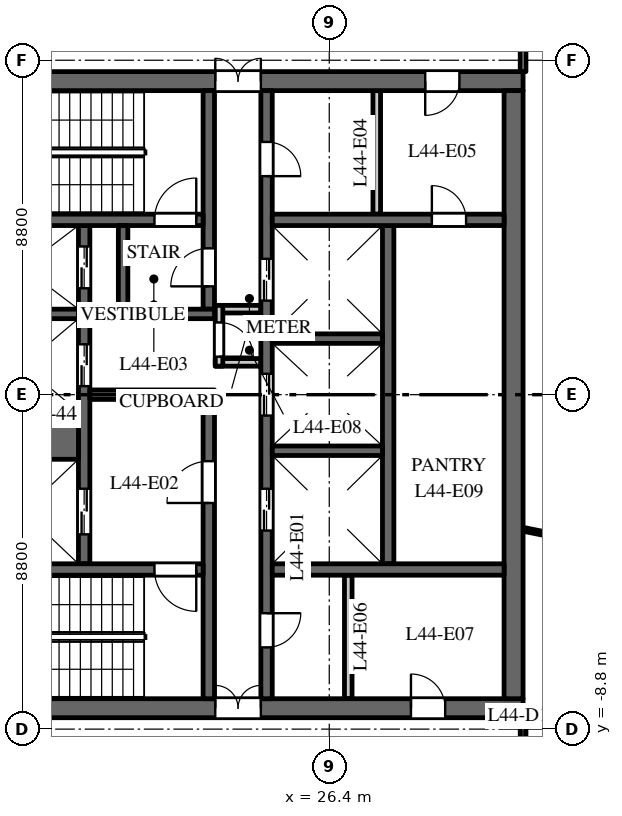
"""IFC4 building model, lengths in metres.
Left out: names, types, materials, properties, quantities, classifications, styles, units other than length and angle.
Written with IfcOpenShell. Run it as: python <this file> out.ifc"""

import sys

from ifc_helpers import new_model, si_unit, direction, frame, frame_2d, origin, place, context, subcontext, project, spatial, rectangle, extrude, element, fill, save


model = new_model("IFC4")
c1 = context("Model", 3, precision=1e-05, world=origin(), true_north=direction((0.0, 1.0)))
c2 = subcontext(c1, "Body", "Model", "MODEL_VIEW")
j1 = project(units=[si_unit("LENGTHUNIT", "METRE"), si_unit("PLANEANGLEUNIT", "RADIAN")], contexts=[c1])
p1 = place(None, origin())
s1 = spatial("IfcSite", under=j1, at=p1, CompositionType="ELEMENT")
p2 = place(p1, origin())
s2 = spatial("IfcBuilding", under=s1, at=p2, CompositionType="ELEMENT")
p3 = place(p2, frame((0.0, 0.0, 190.0)))
s3 = spatial("IfcBuildingStorey", under=s2, at=p3, CompositionType="ELEMENT", Elevation=190.0)
p4 = place(p3, frame((16.5, 8.25, 0.0), z_axis=(0.0, 0.0, 1.0), x_axis=(1.0, 0.0, 0.0)))
e1 = element("IfcWall", 1, at=p4, inside=s3, PredefinedType="SHEAR", context=c2, shape_type="SweptSolid", body=[
    extrude(rectangle(XDim=15.0, YDim=0.5, at=frame_2d((7.5, 0.0))), origin(), (0.0, 0.0, 1.0), 3.7),
])
p5 = place(p4, frame((6.9, 0.0, 0.0)))
e2 = element("IfcOpeningElement", 2, at=p5, cuts=e1, PredefinedType="OPENING", context=c2, shape_type="SweptSolid", body=[
    extrude(rectangle(XDim=1.2, YDim=2.1, at=frame_2d((0.6, 1.05))), frame((0.0, 0.26, 0.0), z_axis=(0.0, -1.0, 0.0), x_axis=(1.0, 0.0, 0.0)), (0.0, 0.0, 1.0), 0.52),
])
p6 = place(p4, frame((12.425, 0.0, 0.0)))
e3 = element("IfcOpeningElement", 3, at=p6, cuts=e1, PredefinedType="OPENING", context=c2, shape_type="SweptSolid", body=[
    extrude(rectangle(XDim=0.9, YDim=2.1, at=frame_2d((0.45, 1.05))), frame((0.0, 0.26, 0.0), z_axis=(0.0, -1.0, 0.0), x_axis=(1.0, 0.0, 0.0)), (0.0, 0.0, 1.0), 0.52),
])
p7 = place(p3, frame((16.5, -8.25, 0.0), z_axis=(0.0, 0.0, 1.0), x_axis=(1.0, 0.0, 0.0)))
e4 = element("IfcWall", 4, at=p7, inside=s3, PredefinedType="SHEAR", context=c2, shape_type="SweptSolid", body=[
    extrude(rectangle(XDim=15.0, YDim=0.5, at=frame_2d((7.5, 0.0))), origin(), (0.0, 0.0, 1.0), 3.7),
])
p8 = place(p7, frame((6.9, 0.0, 0.0)))
e5 = element("IfcOpeningElement", 5, at=p8, cuts=e4, PredefinedType="OPENING", context=c2, shape_type="SweptSolid", body=[
    extrude(rectangle(XDim=1.2, YDim=2.1, at=frame_2d((0.6, 1.05))), frame((0.0, 0.26, 0.0), z_axis=(0.0, -1.0, 0.0), x_axis=(1.0, 0.0, 0.0)), (0.0, 0.0, 1.0), 0.52),
])
p9 = place(p7, frame((12.05, 0.0, 0.0)))
e6 = element("IfcOpeningElement", 6, at=p9, cuts=e4, PredefinedType="OPENING", context=c2, shape_type="SweptSolid", body=[
    extrude(rectangle(XDim=0.9, YDim=2.1, at=frame_2d((0.45, 1.05))), frame((0.0, 0.26, 0.0), z_axis=(0.0, -1.0, 0.0), x_axis=(1.0, 0.0, 0.0)), (0.0, 0.0, 1.0), 0.52),
])
p10 = place(p3, frame((27.95, -4.45, 0.0), z_axis=(0.0, 0.0, 1.0), x_axis=(0.0, 1.0, 0.0)))
e7 = element("IfcWall", 7, at=p10, inside=s3, PredefinedType="SHEAR", context=c2, shape_type="SweptSolid", body=[
    extrude(rectangle(XDim=8.9, YDim=0.3, at=frame_2d((4.45, 0.0))), origin(), (0.0, 0.0, 1.0), 3.7),
])
p11 = place(p3, frame((19.95, -4.45, 0.0), z_axis=(0.0, 0.0, 1.0), x_axis=(0.0, 1.0, 0.0)))
e8 = element("IfcWall", 8, at=p11, inside=s3, PredefinedType="SHEAR", context=c2, shape_type="SweptSolid", body=[
    extrude(rectangle(XDim=8.9, YDim=0.3, at=frame_2d((4.45, 0.0))), origin(), (0.0, 0.0, 1.0), 3.7),
])
p12 = place(p11, frame((0.775, 0.0, 0.0)))
e9 = element("IfcOpeningElement", 9, at=p12, cuts=e8, PredefinedType="OPENING", context=c2, shape_type="SweptSolid", body=[
    extrude(rectangle(XDim=1.2, YDim=2.1, at=frame_2d((0.6, 1.05))), frame((0.0, 0.16, 0.0), z_axis=(0.0, -1.0, 0.0), x_axis=(1.0, 0.0, 0.0)), (0.0, 0.0, 1.0), 0.32),
])
p13 = place(p11, frame((4.675, 0.0, 0.0)))
e10 = element("IfcOpeningElement", 10, at=p13, cuts=e8, PredefinedType="OPENING", context=c2, shape_type="SweptSolid", body=[
    extrude(rectangle(XDim=1.1, YDim=2.1, at=frame_2d((0.55, 1.05))), frame((0.0, 0.16, 0.0), z_axis=(0.0, -1.0, 0.0), x_axis=(1.0, 0.0, 0.0)), (0.0, 0.0, 1.0), 0.32),
])
p14 = place(p11, frame((7.25, 0.0, 0.0)))
e11 = element("IfcOpeningElement", 11, at=p14, cuts=e8, PredefinedType="OPENING", context=c2, shape_type="SweptSolid", body=[
    extrude(rectangle(XDim=1.1, YDim=2.1, at=frame_2d((0.55, 1.05))), frame((0.0, 0.16, 0.0), z_axis=(0.0, -1.0, 0.0), x_axis=(1.0, 0.0, 0.0)), (0.0, 0.0, 1.0), 0.32),
])
p15 = place(p3, frame((24.75, -8.0, 0.0), z_axis=(0.0, 0.0, 1.0), x_axis=(0.0, 1.0, 0.0)))
e12 = element("IfcWall", 12, at=p15, inside=s3, PredefinedType="SHEAR", context=c2, shape_type="SweptSolid", body=[
    extrude(rectangle(XDim=16.0, YDim=0.3, at=frame_2d((8.0, 0.0))), origin(), (0.0, 0.0, 1.0), 3.7),
])
p16 = place(p15, frame((4.425, 0.0, 0.0)))
e13 = element("IfcOpeningElement", 13, at=p16, cuts=e12, PredefinedType="OPENING", context=c2, shape_type="SweptSolid", body=[
    extrude(rectangle(XDim=1.1, YDim=2.1, at=frame_2d((0.55, 1.05))), frame((0.0, 0.16, 0.0), z_axis=(0.0, -1.0, 0.0), x_axis=(1.0, 0.0, 0.0)), (0.0, 0.0, 1.0), 0.32),
])
p17 = place(p15, frame((7.45, 0.0, 0.0)))
e14 = element("IfcOpeningElement", 14, at=p17, cuts=e12, PredefinedType="OPENING", context=c2, shape_type="SweptSolid", body=[
    extrude(rectangle(XDim=1.1, YDim=2.1, at=frame_2d((0.55, 1.05))), frame((0.0, 0.16, 0.0), z_axis=(0.0, -1.0, 0.0), x_axis=(1.0, 0.0, 0.0)), (0.0, 0.0, 1.0), 0.32),
])
p18 = place(p15, frame((10.475, 0.0, 0.0)))
e15 = element("IfcOpeningElement", 15, at=p18, cuts=e12, PredefinedType="OPENING", context=c2, shape_type="SweptSolid", body=[
    extrude(rectangle(XDim=1.1, YDim=2.1, at=frame_2d((0.55, 1.05))), frame((0.0, 0.16, 0.0), z_axis=(0.0, -1.0, 0.0), x_axis=(1.0, 0.0, 0.0)), (0.0, 0.0, 1.0), 0.32),
])
p19 = place(p15, frame((13.75, 0.0, 0.0)))
e16 = element("IfcOpeningElement", 16, at=p19, cuts=e12, PredefinedType="OPENING", context=c2, shape_type="SweptSolid", body=[
    extrude(rectangle(XDim=0.9, YDim=2.1, at=frame_2d((0.45, 1.05))), frame((0.0, 0.16, 0.0), z_axis=(0.0, -1.0, 0.0), x_axis=(1.0, 0.0, 0.0)), (0.0, 0.0, 1.0), 0.32),
])
p20 = place(p15, frame((1.35, 0.0, 0.0)))
e17 = element("IfcOpeningElement", 17, at=p20, cuts=e12, PredefinedType="OPENING", context=c2, shape_type="SweptSolid", body=[
    extrude(rectangle(XDim=0.9, YDim=2.1, at=frame_2d((0.45, 1.05))), frame((0.0, 0.16, 0.0), z_axis=(0.0, -1.0, 0.0), x_axis=(1.0, 0.0, 0.0)), (0.0, 0.0, 1.0), 0.32),
])
p21 = place(p3, frame((20.1, 0.0, 0.0), z_axis=(0.0, 0.0, 1.0), x_axis=(1.0, 0.0, 0.0)))
e18 = element("IfcWall", 18, at=p21, inside=s3, PredefinedType="SHEAR", context=c2, shape_type="SweptSolid", body=[
    extrude(rectangle(XDim=3.28, YDim=0.25, at=frame_2d((1.64, 0.0))), origin(), (0.0, 0.0, 1.0), 3.7),
])
for number, where, z_axis, x_axis in (
    (19, (23.4, 0.85, 0.0), (0.0, 0.0, 1.0), (1.0, 0.0, 0.0)),
    (20, (23.4, 2.25, 0.0), (0.0, 0.0, 1.0), (1.0, 0.0, 0.0)),
):
    element("IfcWall", number, at=place(p3, frame(where, z_axis=z_axis, x_axis=x_axis)), inside=s3, PredefinedType="PARTITIONING", context=c2, shape_type="SweptSolid", body=[
        extrude(rectangle(XDim=1.2, YDim=0.2, at=frame_2d((0.6, 0.0))), origin(), (0.0, 0.0, 1.0), 3.7),
    ])
p22 = place(p3, frame((23.5, 0.75, 0.0), z_axis=(0.0, 0.0, 1.0), x_axis=(0.0, 1.0, 0.0)))
e21 = element("IfcWall", 21, at=p22, inside=s3, PredefinedType="PARTITIONING", context=c2, shape_type="SweptSolid", body=[
    extrude(rectangle(XDim=1.6, YDim=0.2, at=frame_2d((0.8, 0.0))), origin(), (0.0, 0.0, 1.0), 3.7),
])
p23 = place(p22, frame((0.25, 0.0, 0.0)))
e22 = element("IfcOpeningElement", 22, at=p23, cuts=e21, PredefinedType="OPENING", context=c2, shape_type="SweptSolid", body=[
    extrude(rectangle(XDim=0.9, YDim=2.1, at=frame_2d((0.45, 1.05))), frame((0.0, 0.11, 0.0), z_axis=(0.0, -1.0, 0.0), x_axis=(1.0, 0.0, 0.0)), (0.0, 0.0, 1.0), 0.22),
])
p24 = place(p3, frame((31.25, -8.0, 0.0), z_axis=(0.0, 0.0, 1.0), x_axis=(0.0, 1.0, 0.0)))
e23 = element("IfcWall", 23, at=p24, inside=s3, PredefinedType="SHEAR", context=c2, shape_type="SweptSolid", body=[
    extrude(rectangle(XDim=16.0, YDim=0.5, at=frame_2d((8.0, 0.0))), origin(), (0.0, 0.0, 1.0), 3.7),
])
p25 = place(p3, frame((24.9, 4.6, 0.0), z_axis=(0.0, 0.0, 1.0), x_axis=(1.0, 0.0, 0.0)))
e24 = element("IfcWall", 24, at=p25, inside=s3, PredefinedType="SHEAR", context=c2, shape_type="SweptSolid", body=[
    extrude(rectangle(XDim=6.1, YDim=0.3, at=frame_2d((3.05, 0.0))), origin(), (0.0, 0.0, 1.0), 3.7),
])
p26 = place(p25, frame((4.2, 0.0, 0.0)))
e25 = element("IfcOpeningElement", 25, at=p26, cuts=e24, PredefinedType="OPENING", context=c2, shape_type="SweptSolid", body=[
    extrude(rectangle(XDim=0.9, YDim=2.1, at=frame_2d((0.45, 1.05))), frame((0.0, 0.16, 0.0), z_axis=(0.0, -1.0, 0.0), x_axis=(1.0, 0.0, 0.0)), (0.0, 0.0, 1.0), 0.32),
])
for number, where, z_axis, x_axis in (
    (26, (27.65, 4.75, 0.0), (0.0, 0.0, 1.0), (0.0, 1.0, 0.0)),
    (27, (26.9, -8.0, 0.0), (0.0, 0.0, 1.0), (0.0, 1.0, 0.0)),
):
    element("IfcWall", number, at=place(p3, frame(where, z_axis=z_axis, x_axis=x_axis)), inside=s3, PredefinedType="PARTITIONING", context=c2, shape_type="SweptSolid", body=[
        extrude(rectangle(XDim=3.25, YDim=0.2, at=frame_2d((1.625, 0.0))), origin(), (0.0, 0.0, 1.0), 3.7),
    ])
p27 = place(p3, frame((24.9, -4.6, 0.0), z_axis=(0.0, 0.0, 1.0), x_axis=(1.0, 0.0, 0.0)))
e28 = element("IfcWall", 28, at=p27, inside=s3, PredefinedType="SHEAR", context=c2, shape_type="SweptSolid", body=[
    extrude(rectangle(XDim=6.1, YDim=0.3, at=frame_2d((3.05, 0.0))), origin(), (0.0, 0.0, 1.0), 3.7),
])
p28 = place(p3, frame((16.9, -1.075, 0.0), z_axis=(0.0, 0.0, 1.0), x_axis=(1.0, 0.0, 0.0)))
e29 = element("IfcWall", 29, at=p28, inside=s3, PredefinedType="SHEAR", context=c2, shape_type="SweptSolid", body=[
    extrude(rectangle(XDim=2.9, YDim=1.25, at=frame_2d((1.45, 0.0))), origin(), (0.0, 0.0, 1.0), 3.7),
])
for number, where, z_axis, x_axis in (
    (30, (16.9, 2.125, 0.0), (0.0, 0.0, 1.0), (1.0, 0.0, 0.0)),
    (31, (24.9, -1.475, 0.0), (0.0, 0.0, 1.0), (1.0, 0.0, 0.0)),
    (32, (24.9, 1.475, 0.0), (0.0, 0.0, 1.0), (1.0, 0.0, 0.0)),
):
    element("IfcWall", number, at=place(p3, frame(where, z_axis=z_axis, x_axis=x_axis)), inside=s3, PredefinedType="SHEAR", context=c2, shape_type="SweptSolid", body=[
        extrude(rectangle(XDim=2.9, YDim=0.25, at=frame_2d((1.45, 0.0))), origin(), (0.0, 0.0, 1.0), 3.7),
    ])
p29 = place(p3, frame((23.23, 2.25, 0.0), z_axis=(0.0, 0.0, 1.0), x_axis=(0.0, 1.0, 0.0)))
e33 = element("IfcWall", 33, at=p29, inside=s3, PredefinedType="SHEAR", context=c2, shape_type="SweptSolid", body=[
    extrude(rectangle(XDim=5.75, YDim=0.3, at=frame_2d((2.875, 0.0))), origin(), (0.0, 0.0, 1.0), 3.7),
])
p30 = place(p29, frame((0.6, 0.0, 0.0)))
e34 = element("IfcOpeningElement", 34, at=p30, cuts=e33, PredefinedType="OPENING", context=c2, shape_type="SweptSolid", body=[
    extrude(rectangle(XDim=1.0, YDim=2.1, at=frame_2d((0.5, 1.05))), frame((0.0, 0.16, 0.0), z_axis=(0.0, -1.0, 0.0), x_axis=(1.0, 0.0, 0.0)), (0.0, 0.0, 1.0), 0.32),
])
p31 = place(p3, frame((23.23, -8.0, 0.0), z_axis=(0.0, 0.0, 1.0), x_axis=(0.0, 1.0, 0.0)))
e35 = element("IfcWall", 35, at=p31, inside=s3, PredefinedType="SHEAR", context=c2, shape_type="SweptSolid", body=[
    extrude(rectangle(XDim=7.875, YDim=0.3, at=frame_2d((3.938, 0.0))), origin(), (0.0, 0.0, 1.0), 3.7),
])
p32 = place(p31, frame((5.15, 0.0, 0.0)))
e36 = element("IfcOpeningElement", 36, at=p32, cuts=e35, PredefinedType="OPENING", context=c2, shape_type="SweptSolid", body=[
    extrude(rectangle(XDim=1.1, YDim=2.1, at=frame_2d((0.55, 1.05))), frame((0.0, 0.16, 0.0), z_axis=(0.0, -1.0, 0.0), x_axis=(1.0, 0.0, 0.0)), (0.0, 0.0, 1.0), 0.32),
])
p33 = place(p3, frame((16.9, 4.6, 0.0), z_axis=(0.0, 0.0, 1.0), x_axis=(1.0, 0.0, 0.0)))
e37 = element("IfcWall", 37, at=p33, inside=s3, PredefinedType="SHEAR", context=c2, shape_type="SweptSolid", body=[
    extrude(rectangle(XDim=6.18, YDim=0.3, at=frame_2d((3.09, 0.0))), origin(), (0.0, 0.0, 1.0), 3.7),
])
p34 = place(p33, frame((4.9, 0.0, 0.0)))
e38 = element("IfcOpeningElement", 38, at=p34, cuts=e37, PredefinedType="OPENING", context=c2, shape_type="SweptSolid", body=[
    extrude(rectangle(XDim=1.1, YDim=2.1, at=frame_2d((0.55, 1.05))), frame((0.0, 0.16, 0.0), z_axis=(0.0, -1.0, 0.0), x_axis=(1.0, 0.0, 0.0)), (0.0, 0.0, 1.0), 0.32),
])
p35 = place(p3, frame((16.9, -4.6, 0.0), z_axis=(0.0, 0.0, 1.0), x_axis=(1.0, 0.0, 0.0)))
e39 = element("IfcWall", 39, at=p35, inside=s3, PredefinedType="SHEAR", context=c2, shape_type="SweptSolid", body=[
    extrude(rectangle(XDim=6.18, YDim=0.3, at=frame_2d((3.09, 0.0))), origin(), (0.0, 0.0, 1.0), 3.7),
])
p36 = place(p35, frame((4.9, 0.0, 0.0)))
e40 = element("IfcOpeningElement", 40, at=p36, cuts=e39, PredefinedType="OPENING", context=c2, shape_type="SweptSolid", body=[
    extrude(rectangle(XDim=1.1, YDim=2.1, at=frame_2d((0.55, 1.05))), frame((0.0, 0.16, 0.0), z_axis=(0.0, -1.0, 0.0), x_axis=(1.0, 0.0, 0.0)), (0.0, 0.0, 1.0), 0.32),
])
p37 = place(p3, frame((20.85, 2.125, 0.0), z_axis=(0.0, 0.0, 1.0), x_axis=(1.0, 0.0, 0.0)))
e41 = element("IfcWall", 41, at=p37, inside=s3, PredefinedType="SHEAR", context=c2, shape_type="SweptSolid", body=[
    extrude(rectangle(XDim=2.53, YDim=0.25, at=frame_2d((1.265, 0.0))), origin(), (0.0, 0.0, 1.0), 3.7),
])
p38 = place(p3, frame((20.975, 2.25, 0.0), z_axis=(0.0, 0.0, 1.0), x_axis=(0.0, 1.0, 0.0)))
e42 = element("IfcWall", 42, at=p38, inside=s3, PredefinedType="SHEAR", context=c2, shape_type="SweptSolid", body=[
    extrude(rectangle(XDim=2.2, YDim=0.25, at=frame_2d((1.1, 0.0))), origin(), (0.0, 0.0, 1.0), 3.7),
])
p39 = place(p3, frame((31.5, -10.7, 0.0), z_axis=(0.0, 0.0, 1.0), x_axis=(0.0, 1.0, 0.0)))
e43 = element("IfcWall", 43, at=p39, inside=s3, PredefinedType="PARTITIONING", context=c2, shape_type="SweptSolid", body=[
    extrude(rectangle(XDim=2.2, YDim=0.15, at=frame_2d((1.1, 0.0))), origin(), (0.0, 0.0, 1.0), 2.9),
])
p40 = place(p39, frame((0.65, 0.0, 0.0)))
e44 = element("IfcOpeningElement", 44, at=p40, cuts=e43, PredefinedType="OPENING", context=c2, shape_type="SweptSolid", body=[
    extrude(rectangle(XDim=1.0, YDim=2.1, at=frame_2d((0.5, 1.05))), frame((0.0, 0.085, 0.0), z_axis=(0.0, -1.0, 0.0), x_axis=(1.0, 0.0, 0.0)), (0.0, 0.0, 1.0), 0.17),
])
p41 = place(p3, frame((31.5, -3.542, 0.0), z_axis=(0.0, 0.0, 1.0), x_axis=(0.980357474535, -0.197228857227, 0.0)))
e45 = element("IfcWall", 45, at=p41, inside=s3, PredefinedType="PARTITIONING", context=c2, shape_type="SweptSolid", body=[
    extrude(rectangle(XDim=4.092, YDim=0.1, at=frame_2d((2.046, 0.0))), origin(), (0.0, 0.0, 1.0), 2.9),
])
p42 = place(p3, frame((31.5, 8.5, 0.0), z_axis=(0.0, 0.0, 1.0), x_axis=(0.0, 1.0, 0.0)))
e46 = element("IfcWall", 46, at=p42, inside=s3, PredefinedType="PARTITIONING", context=c2, shape_type="SweptSolid", body=[
    extrude(rectangle(XDim=2.2, YDim=0.15, at=frame_2d((1.1, 0.0))), origin(), (0.0, 0.0, 1.0), 2.9),
])
p43 = place(p42, frame((0.65, 0.0, 0.0)))
e47 = element("IfcOpeningElement", 47, at=p43, cuts=e46, PredefinedType="OPENING", context=c2, shape_type="SweptSolid", body=[
    extrude(rectangle(XDim=1.0, YDim=2.1, at=frame_2d((0.5, 1.05))), frame((0.0, 0.085, 0.0), z_axis=(0.0, -1.0, 0.0), x_axis=(1.0, 0.0, 0.0)), (0.0, 0.0, 1.0), 0.17),
])
p44 = place(p12, origin())
e48 = element("IfcDoor", 48, at=p44, inside=s3, OperationType="DOUBLE_DOOR_SLIDING", PredefinedType="DOOR", context=c2, shape_type="SweptSolid", body=[
    extrude(rectangle(XDim=1.2, YDim=2.1, at=frame_2d((0.6, 1.05))), frame((0.0, 0.025, 0.0), z_axis=(0.0, -1.0, 0.0), x_axis=(1.0, 0.0, 0.0)), (0.0, 0.0, 1.0), 0.05),
])
fill(e9, e48)
p45 = place(p13, origin())
e49 = element("IfcDoor", 49, at=p45, inside=s3, OperationType="DOUBLE_DOOR_SLIDING", PredefinedType="DOOR", context=c2, shape_type="SweptSolid", body=[
    extrude(rectangle(XDim=1.1, YDim=2.1, at=frame_2d((0.55, 1.05))), frame((0.0, 0.025, 0.0), z_axis=(0.0, -1.0, 0.0), x_axis=(1.0, 0.0, 0.0)), (0.0, 0.0, 1.0), 0.05),
])
fill(e10, e49)
p46 = place(p14, origin())
e50 = element("IfcDoor", 50, at=p46, inside=s3, OperationType="DOUBLE_DOOR_SLIDING", PredefinedType="DOOR", context=c2, shape_type="SweptSolid", body=[
    extrude(rectangle(XDim=1.1, YDim=2.1, at=frame_2d((0.55, 1.05))), frame((0.0, 0.025, 0.0), z_axis=(0.0, -1.0, 0.0), x_axis=(1.0, 0.0, 0.0)), (0.0, 0.0, 1.0), 0.05),
])
fill(e11, e50)
p47 = place(p16, origin())
e51 = element("IfcDoor", 51, at=p47, inside=s3, OperationType="DOUBLE_DOOR_SLIDING", PredefinedType="DOOR", context=c2, shape_type="SweptSolid", body=[
    extrude(rectangle(XDim=1.1, YDim=2.1, at=frame_2d((0.55, 1.05))), frame((0.0, 0.025, 0.0), z_axis=(0.0, -1.0, 0.0), x_axis=(1.0, 0.0, 0.0)), (0.0, 0.0, 1.0), 0.05),
])
fill(e13, e51)
p48 = place(p17, origin())
e52 = element("IfcDoor", 52, at=p48, inside=s3, OperationType="DOUBLE_DOOR_SLIDING", PredefinedType="DOOR", context=c2, shape_type="SweptSolid", body=[
    extrude(rectangle(XDim=1.1, YDim=2.1, at=frame_2d((0.55, 1.05))), frame((0.0, 0.025, 0.0), z_axis=(0.0, -1.0, 0.0), x_axis=(1.0, 0.0, 0.0)), (0.0, 0.0, 1.0), 0.05),
])
fill(e14, e52)
p49 = place(p18, origin())
e53 = element("IfcDoor", 53, at=p49, inside=s3, OperationType="DOUBLE_DOOR_SLIDING", PredefinedType="DOOR", context=c2, shape_type="SweptSolid", body=[
    extrude(rectangle(XDim=1.1, YDim=2.1, at=frame_2d((0.55, 1.05))), frame((0.0, 0.025, 0.0), z_axis=(0.0, -1.0, 0.0), x_axis=(1.0, 0.0, 0.0)), (0.0, 0.0, 1.0), 0.05),
])
fill(e15, e53)
p50 = place(p34, origin())
e54 = element("IfcDoor", 54, at=p50, inside=s3, OperationType="SINGLE_SWING_LEFT", PredefinedType="DOOR", context=c2, shape_type="SweptSolid", body=[
    extrude(rectangle(XDim=1.1, YDim=2.1, at=frame_2d((0.55, 1.05))), frame((0.0, 0.025, 0.0), z_axis=(0.0, -1.0, 0.0), x_axis=(1.0, 0.0, 0.0)), (0.0, 0.0, 1.0), 0.05),
])
fill(e38, e54)
p51 = place(p36, origin())
e55 = element("IfcDoor", 55, at=p51, inside=s3, OperationType="SINGLE_SWING_RIGHT", PredefinedType="DOOR", context=c2, shape_type="SweptSolid", body=[
    extrude(rectangle(XDim=1.1, YDim=2.1, at=frame_2d((0.55, 1.05))), frame((0.0, 0.025, 0.0), z_axis=(0.0, -1.0, 0.0), x_axis=(1.0, 0.0, 0.0)), (0.0, 0.0, 1.0), 0.05),
])
fill(e40, e55)
p52 = place(p32, origin())
e56 = element("IfcDoor", 56, at=p52, inside=s3, OperationType="SINGLE_SWING_RIGHT", PredefinedType="DOOR", context=c2, shape_type="SweptSolid", body=[
    extrude(rectangle(XDim=1.1, YDim=2.1, at=frame_2d((0.55, 1.05))), frame((0.0, 0.025, 0.0), z_axis=(0.0, -1.0, 0.0), x_axis=(1.0, 0.0, 0.0)), (0.0, 0.0, 1.0), 0.05),
])
fill(e36, e56)
p53 = place(p30, origin())
e57 = element("IfcDoor", 57, at=p53, inside=s3, OperationType="SINGLE_SWING_RIGHT", PredefinedType="DOOR", context=c2, shape_type="SweptSolid", body=[
    extrude(rectangle(XDim=1.0, YDim=2.1, at=frame_2d((0.5, 1.05))), frame((0.0, 0.025, 0.0), z_axis=(0.0, -1.0, 0.0), x_axis=(1.0, 0.0, 0.0)), (0.0, 0.0, 1.0), 0.05),
])
fill(e34, e57)
p54 = place(p5, origin())
e58 = element("IfcDoor", 58, at=p54, inside=s3, OperationType="DOUBLE_DOOR_DOUBLE_SWING", PredefinedType="DOOR", context=c2, shape_type="SweptSolid", body=[
    extrude(rectangle(XDim=1.2, YDim=2.1, at=frame_2d((0.6, 1.05))), frame((0.0, 0.025, 0.0), z_axis=(0.0, -1.0, 0.0), x_axis=(1.0, 0.0, 0.0)), (0.0, 0.0, 1.0), 0.05),
])
fill(e2, e58)
p55 = place(p8, origin())
e59 = element("IfcDoor", 59, at=p55, inside=s3, OperationType="DOUBLE_DOOR_DOUBLE_SWING", PredefinedType="DOOR", context=c2, shape_type="SweptSolid", body=[
    extrude(rectangle(XDim=1.2, YDim=2.1, at=frame_2d((0.6, 1.05))), frame((0.0, 0.025, 0.0), z_axis=(0.0, -1.0, 0.0), x_axis=(1.0, 0.0, 0.0)), (0.0, 0.0, 1.0), 0.05),
])
fill(e5, e59)
p56 = place(p19, origin())
e60 = element("IfcDoor", 60, at=p56, inside=s3, OperationType="SINGLE_SWING_LEFT", PredefinedType="DOOR", context=c2, shape_type="SweptSolid", body=[
    extrude(rectangle(XDim=0.9, YDim=2.1, at=frame_2d((0.45, 1.05))), frame((0.0, 0.025, 0.0), z_axis=(0.0, -1.0, 0.0), x_axis=(1.0, 0.0, 0.0)), (0.0, 0.0, 1.0), 0.05),
])
fill(e16, e60)
p57 = place(p6, origin())
e61 = element("IfcDoor", 61, at=p57, inside=s3, OperationType="SINGLE_SWING_LEFT", PredefinedType="DOOR", context=c2, shape_type="SweptSolid", body=[
    extrude(rectangle(XDim=0.9, YDim=2.1, at=frame_2d((0.45, 1.05))), frame((0.0, 0.025, 0.0), z_axis=(0.0, -1.0, 0.0), x_axis=(1.0, 0.0, 0.0)), (0.0, 0.0, 1.0), 0.05),
])
fill(e3, e61)
p58 = place(p20, origin())
e62 = element("IfcDoor", 62, at=p58, inside=s3, OperationType="SINGLE_SWING_RIGHT", PredefinedType="DOOR", context=c2, shape_type="SweptSolid", body=[
    extrude(rectangle(XDim=0.9, YDim=2.1, at=frame_2d((0.45, 1.05))), frame((0.0, 0.025, 0.0), z_axis=(0.0, -1.0, 0.0), x_axis=(1.0, 0.0, 0.0)), (0.0, 0.0, 1.0), 0.05),
])
fill(e17, e62)
p59 = place(p9, origin())
e63 = element("IfcDoor", 63, at=p59, inside=s3, OperationType="SINGLE_SWING_RIGHT", PredefinedType="DOOR", context=c2, shape_type="SweptSolid", body=[
    extrude(rectangle(XDim=0.9, YDim=2.1, at=frame_2d((0.45, 1.05))), frame((0.0, 0.025, 0.0), z_axis=(0.0, -1.0, 0.0), x_axis=(1.0, 0.0, 0.0)), (0.0, 0.0, 1.0), 0.05),
])
fill(e6, e63)
p60 = place(p23, origin())
e64 = element("IfcDoor", 64, at=p60, inside=s3, OperationType="SINGLE_SWING_LEFT", PredefinedType="DOOR", context=c2, shape_type="SweptSolid", body=[
    extrude(rectangle(XDim=0.9, YDim=2.1, at=frame_2d((0.45, 1.05))), frame((0.0, 0.025, 0.0), z_axis=(0.0, -1.0, 0.0), x_axis=(1.0, 0.0, 0.0)), (0.0, 0.0, 1.0), 0.05),
])
fill(e22, e64)
p61 = place(p26, origin())
e65 = element("IfcDoor", 65, at=p61, inside=s3, OperationType="SINGLE_SWING_RIGHT", PredefinedType="DOOR", context=c2, shape_type="SweptSolid", body=[
    extrude(rectangle(XDim=0.9, YDim=2.1, at=frame_2d((0.45, 1.05))), frame((0.0, 0.025, 0.0), z_axis=(0.0, -1.0, 0.0), x_axis=(1.0, 0.0, 0.0)), (0.0, 0.0, 1.0), 0.05),
])
fill(e25, e65)
save(model, sys.argv[1])
